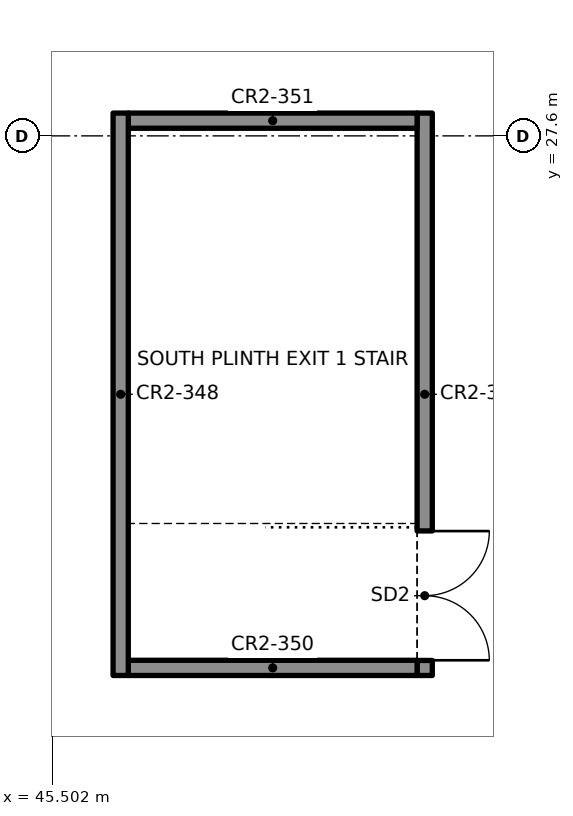
"""IFC4 building model, lengths in metres.
Left out: names, types, materials, properties, quantities, classifications, styles, units other than length and angle.
Written with IfcOpenShell. Run it as: python <this file> out.ifc"""

import sys

from ifc_helpers import new_model, si_unit, direction, frame, frame_2d, origin, place, context, subcontext, project, spatial, rectangle, extrude, element, fill, save


model = new_model("IFC4")
c1 = context("Model", 3, precision=1e-05, world=origin(), true_north=direction((0.0, 1.0)))
c2 = subcontext(c1, "Body", "Model", "MODEL_VIEW")
j1 = project(units=[si_unit("LENGTHUNIT", "METRE"), si_unit("PLANEANGLEUNIT", "RADIAN")], contexts=[c1])
p1 = place(None, origin())
s1 = spatial("IfcSite", under=j1, at=p1, CompositionType="ELEMENT")
p2 = place(p1, origin())
s2 = spatial("IfcBuilding", under=s1, at=p2, CompositionType="ELEMENT")
p3 = place(p2, frame((0.0, 0.0, 4.4)))
s3 = spatial("IfcBuildingStorey", under=s2, at=p3, CompositionType="ELEMENT", Elevation=4.4)
p4 = place(p3, frame((46.4, 20.5, 0.0), z_axis=(0.0, 0.0, 1.0), x_axis=(0.0, 1.0, 0.0)))
e1 = element("IfcWall", 1, at=p4, inside=s3, PredefinedType="SOLIDWALL", context=c2, shape_type="SweptSolid", body=[
    extrude(rectangle(XDim=7.4, YDim=0.2, at=frame_2d((3.7, 0.0))), origin(), (0.0, 0.0, 1.0), 3.0),
])
p5 = place(p3, frame((50.4, 20.5, 0.0), z_axis=(0.0, 0.0, 1.0), x_axis=(0.0, 1.0, 0.0)))
e2 = element("IfcWall", 2, at=p5, inside=s3, PredefinedType="SOLIDWALL", context=c2, shape_type="SweptSolid", body=[
    extrude(rectangle(XDim=7.4, YDim=0.2, at=frame_2d((3.7, 0.0))), origin(), (0.0, 0.0, 1.0), 3.0),
])
p6 = place(p5, frame((0.2, 0.0, 0.0)))
e3 = element("IfcOpeningElement", 3, at=p6, cuts=e2, PredefinedType="OPENING", context=c2, shape_type="SweptSolid", body=[
    extrude(rectangle(XDim=1.7, YDim=2.1, at=frame_2d((0.85, 1.05))), frame((0.0, 0.11, 0.0), z_axis=(0.0, -1.0, 0.0), x_axis=(1.0, 0.0, 0.0)), (0.0, 0.0, 1.0), 0.22),
])
for number, where, z_axis, x_axis in (
    (4, (46.5, 20.6, 0.0), (0.0, 0.0, 1.0), (1.0, 0.0, 0.0)),
    (5, (46.5, 27.8, 0.0), (0.0, 0.0, 1.0), (1.0, 0.0, 0.0)),
):
    element("IfcWall", number, at=place(p3, frame(where, z_axis=z_axis, x_axis=x_axis)), inside=s3, PredefinedType="SOLIDWALL", context=c2, shape_type="SweptSolid", body=[
        extrude(rectangle(XDim=3.8, YDim=0.2, at=frame_2d((1.9, 0.0))), origin(), (0.0, 0.0, 1.0), 3.0),
    ])
p7 = place(p6, origin())
e6 = element("IfcDoor", 6, at=p7, inside=s3, OperationType="DOUBLE_DOOR_SINGLE_SWING", PredefinedType="DOOR", context=c2, shape_type="SweptSolid", body=[
    extrude(rectangle(XDim=1.7, YDim=2.1, at=frame_2d((0.85, 1.05))), frame((0.0, 0.025, 0.0), z_axis=(0.0, -1.0, 0.0), x_axis=(1.0, 0.0, 0.0)), (0.0, 0.0, 1.0), 0.05),
])
fill(e3, e6)
save(model, sys.argv[1])
